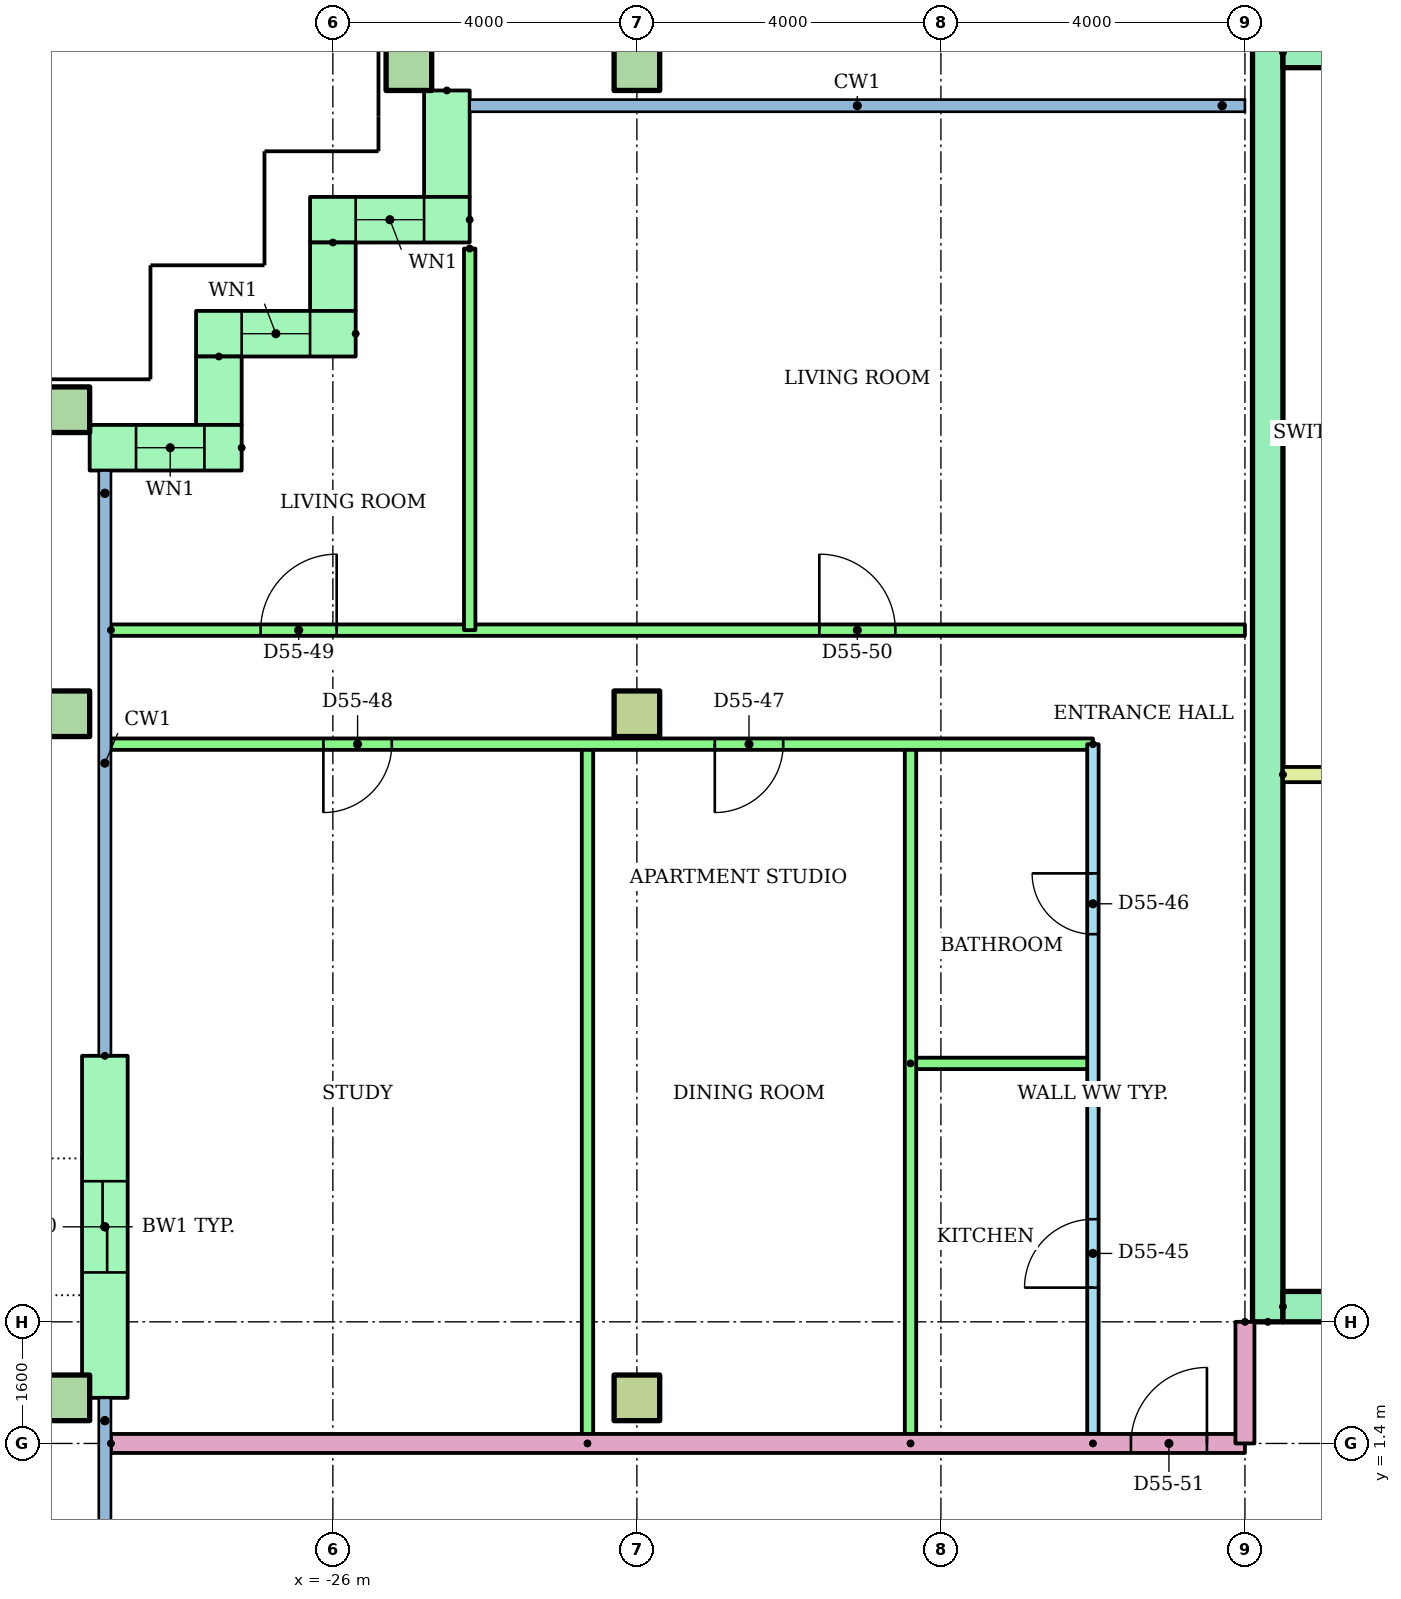
"""IFC4 building model, lengths in metres.
Left out: names, types, materials, properties, quantities, classifications, styles, units other than length and angle.
Written with IfcOpenShell. Run it as: python <this file> out.ifc"""

import sys

from ifc_helpers import new_model, si_unit, direction, frame, frame_2d, origin, origin_2d, place, context, subcontext, project, spatial, rectangle, hollow_rectangle, extrude, element, fill, save


model = new_model("IFC4")
c1 = context("Model", 3, precision=1e-05, world=origin(), true_north=direction((0.0, 1.0)))
c2 = subcontext(c1, "Body", "Model", "MODEL_VIEW")
j1 = project(units=[si_unit("LENGTHUNIT", "METRE"), si_unit("PLANEANGLEUNIT", "RADIAN")], contexts=[c1])
p1 = place(None, origin())
s1 = spatial("IfcSite", under=j1, at=p1, CompositionType="ELEMENT")
p2 = place(p1, origin())
s2 = spatial("IfcBuilding", under=s1, at=p2, CompositionType="ELEMENT")
p3 = place(p2, frame((0.0, 0.0, 214.0)))
s3 = spatial("IfcBuildingStorey", under=s2, at=p3, CompositionType="ELEMENT", Elevation=214.0)
p4 = place(p3, frame((-29.5, 2.0, 0.0)))
e1 = element("IfcColumn", 1, at=p4, inside=s3, PredefinedType="COLUMN", context=c2, shape_type="SweptSolid", body=[
    extrude(hollow_rectangle(XDim=0.6, YDim=0.6, WallThickness=0.03, at=origin_2d()), origin(), (0.0, 0.0, 1.0), 3.2),
])
p5 = place(p3, frame((-22.0, 2.0, 0.0)))
e2 = element("IfcColumn", 2, at=p5, inside=s3, PredefinedType="COLUMN", context=c2, shape_type="SweptSolid", body=[
    extrude(rectangle(XDim=0.6, YDim=0.6, at=origin_2d()), origin(), (0.0, 0.0, 1.0), 3.2),
])
p6 = place(p3, frame((-29.5, 11.0, 0.0)))
e3 = element("IfcColumn", 3, at=p6, inside=s3, PredefinedType="COLUMN", context=c2, shape_type="SweptSolid", body=[
    extrude(hollow_rectangle(XDim=0.6, YDim=0.6, WallThickness=0.03, at=origin_2d()), origin(), (0.0, 0.0, 1.0), 3.2),
])
p7 = place(p3, frame((-22.0, 11.0, 0.0)))
e4 = element("IfcColumn", 4, at=p7, inside=s3, PredefinedType="COLUMN", context=c2, shape_type="SweptSolid", body=[
    extrude(rectangle(XDim=0.6, YDim=0.6, at=origin_2d()), origin(), (0.0, 0.0, 1.0), 3.2),
])
for number, where in (
    (5, (-29.5, 15.0, 0.0)),
    (6, (-25.0, 19.5, 0.0)),
    (7, (-22.0, 19.5, 0.0)),
):
    element("IfcColumn", number, at=place(p3, frame(where)), inside=s3, PredefinedType="COLUMN", context=c2, shape_type="SweptSolid", body=[
        extrude(hollow_rectangle(XDim=0.6, YDim=0.6, WallThickness=0.03, at=origin_2d()), origin(), (0.0, 0.0, 1.0), 3.2),
    ])
p8 = place(p3, frame((-24.5, 19.2, 0.0), z_axis=(0.0, 0.0, 1.0), x_axis=(0.0, -1.0, 0.0)))
e8 = element("IfcWall", 8, at=p8, inside=s3, PredefinedType="STANDARD", context=c2, shape_type="SweptSolid", body=[
    extrude(rectangle(XDim=1.4, YDim=0.6, at=frame_2d((0.7, 0.0))), origin(), (0.0, 0.0, 1.0), 2.92),
])
p9 = place(p3, frame((-24.2, 17.5, 0.0), z_axis=(0.0, 0.0, 1.0), x_axis=(-1.0, 0.0, 0.0)))
e9 = element("IfcWall", 9, at=p9, inside=s3, PredefinedType="STANDARD", context=c2, shape_type="SweptSolid", body=[
    extrude(rectangle(XDim=2.1, YDim=0.6, at=frame_2d((1.05, 0.0))), origin(), (0.0, 0.0, 1.0), 2.92),
])
p10 = place(p9, frame((0.6, 0.0, 0.9)))
e10 = element("IfcOpeningElement", 10, at=p10, cuts=e9, PredefinedType="OPENING", context=c2, shape_type="SweptSolid", body=[
    extrude(rectangle(XDim=0.9, YDim=1.5, at=frame_2d((0.45, 0.75))), frame((0.0, 0.31, 0.0), z_axis=(0.0, -1.0, 0.0), x_axis=(1.0, 0.0, 0.0)), (0.0, 0.0, 1.0), 0.62),
])
p11 = place(p3, frame((-26.0, 17.2, 0.0), z_axis=(0.0, 0.0, 1.0), x_axis=(0.0, -1.0, 0.0)))
e11 = element("IfcWall", 11, at=p11, inside=s3, PredefinedType="STANDARD", context=c2, shape_type="SweptSolid", body=[
    extrude(rectangle(XDim=0.9, YDim=0.6, at=frame_2d((0.45, 0.0))), origin(), (0.0, 0.0, 1.0), 2.92),
])
p12 = place(p3, frame((-25.7, 16.0, 0.0), z_axis=(0.0, 0.0, 1.0), x_axis=(-1.0, 0.0, 0.0)))
e12 = element("IfcWall", 12, at=p12, inside=s3, PredefinedType="STANDARD", context=c2, shape_type="SweptSolid", body=[
    extrude(rectangle(XDim=2.1, YDim=0.6, at=frame_2d((1.05, 0.0))), origin(), (0.0, 0.0, 1.0), 2.92),
])
p13 = place(p12, frame((0.6, 0.0, 0.9)))
e13 = element("IfcOpeningElement", 13, at=p13, cuts=e12, PredefinedType="OPENING", context=c2, shape_type="SweptSolid", body=[
    extrude(rectangle(XDim=0.9, YDim=1.5, at=frame_2d((0.45, 0.75))), frame((0.0, 0.31, 0.0), z_axis=(0.0, -1.0, 0.0), x_axis=(1.0, 0.0, 0.0)), (0.0, 0.0, 1.0), 0.62),
])
p14 = place(p3, frame((-27.5, 15.7, 0.0), z_axis=(0.0, 0.0, 1.0), x_axis=(0.0, -1.0, 0.0)))
e14 = element("IfcWall", 14, at=p14, inside=s3, PredefinedType="STANDARD", context=c2, shape_type="SweptSolid", body=[
    extrude(rectangle(XDim=0.9, YDim=0.6, at=frame_2d((0.45, 0.0))), origin(), (0.0, 0.0, 1.0), 2.92),
])
p15 = place(p3, frame((-27.2, 14.5, 0.0), z_axis=(0.0, 0.0, 1.0), x_axis=(-1.0, 0.0, 0.0)))
e15 = element("IfcWall", 15, at=p15, inside=s3, PredefinedType="STANDARD", context=c2, shape_type="SweptSolid", body=[
    extrude(rectangle(XDim=2.0, YDim=0.6, at=frame_2d((1.0, 0.0))), origin(), (0.0, 0.0, 1.0), 2.92),
])
p16 = place(p15, frame((0.49, 0.0, 0.9)))
e16 = element("IfcOpeningElement", 16, at=p16, cuts=e15, PredefinedType="OPENING", context=c2, shape_type="SweptSolid", body=[
    extrude(rectangle(XDim=0.9, YDim=1.5, at=frame_2d((0.45, 0.75))), frame((0.0, 0.31, 0.0), z_axis=(0.0, -1.0, 0.0), x_axis=(1.0, 0.0, 0.0)), (0.0, 0.0, 1.0), 0.62),
])
p17 = place(p3, frame((-29.0, 6.5, 0.0), z_axis=(0.0, 0.0, 1.0), x_axis=(0.0, -1.0, 0.0)))
e17 = element("IfcWall", 17, at=p17, inside=s3, PredefinedType="STANDARD", context=c2, shape_type="SweptSolid", body=[
    extrude(rectangle(XDim=4.5, YDim=0.6, at=frame_2d((2.25, 0.0))), origin(), (0.0, 0.0, 1.0), 2.92),
])
p18 = place(p17, frame((1.65, 0.0, 0.0)))
e18 = element("IfcOpeningElement", 18, at=p18, cuts=e17, PredefinedType="OPENING", context=c2, shape_type="SweptSolid", body=[
    extrude(rectangle(XDim=1.2, YDim=2.1, at=frame_2d((0.6, 1.05))), frame((0.0, 0.31, 0.0), z_axis=(0.0, -1.0, 0.0), x_axis=(1.0, 0.0, 0.0)), (0.0, 0.0, 1.0), 0.62),
])
p19 = place(p3, frame((-13.7, 3.0, 0.0), z_axis=(0.0, 0.0, 1.0), x_axis=(0.0, 1.0, 0.0)))
e19 = element("IfcWall", 19, at=p19, inside=s3, PredefinedType="SHEAR", context=c2, shape_type="SweptSolid", body=[
    extrude(rectangle(XDim=17.0, YDim=0.4, at=frame_2d((8.5, 0.0))), origin(), (0.0, 0.0, 1.0), 2.92),
])
p20 = place(p3, frame((-13.5, 19.7, 0.0)))
e20 = element("IfcWall", 20, at=p20, inside=s3, PredefinedType="SHEAR", context=c2, shape_type="SweptSolid", body=[
    extrude(rectangle(XDim=27.0, YDim=0.4, at=frame_2d((13.5, 0.0))), origin(), (0.0, 0.0, 1.0), 2.92),
])
p21 = place(p3, frame((-13.5, 3.2, 0.0)))
e21 = element("IfcWall", 21, at=p21, inside=s3, PredefinedType="SHEAR", context=c2, shape_type="SweptSolid", body=[
    extrude(rectangle(XDim=27.0, YDim=0.4, at=frame_2d((13.5, 0.0))), origin(), (0.0, 0.0, 1.0), 2.92),
])
p22 = place(p21, frame((22.083, 0.0, 0.0)))
e22 = element("IfcOpeningElement", 22, at=p22, cuts=e21, PredefinedType="OPENING", context=c2, shape_type="SweptSolid", body=[
    extrude(rectangle(XDim=1.1, YDim=2.1, at=frame_2d((0.55, 1.05))), frame((0.0, 0.21, 0.0), z_axis=(0.0, -1.0, 0.0), x_axis=(1.0, 0.0, 0.0)), (0.0, 0.0, 1.0), 0.42),
])
p23 = place(p21, frame((25.128, 0.0, 0.0)))
e23 = element("IfcOpeningElement", 23, at=p23, cuts=e21, PredefinedType="OPENING", context=c2, shape_type="SweptSolid", body=[
    extrude(rectangle(XDim=1.1, YDim=2.1, at=frame_2d((0.55, 1.05))), frame((0.0, 0.21, 0.0), z_axis=(0.0, -1.0, 0.0), x_axis=(1.0, 0.0, 0.0)), (0.0, 0.0, 1.0), 0.42),
])
p24 = place(p21, frame((12.6, 0.0, 0.0)))
e24 = element("IfcOpeningElement", 24, at=p24, cuts=e21, PredefinedType="OPENING", context=c2, shape_type="SweptSolid", body=[
    extrude(rectangle(XDim=1.8, YDim=2.1, at=frame_2d((0.9, 1.05))), frame((0.0, 0.21, 0.0), z_axis=(0.0, -1.0, 0.0), x_axis=(1.0, 0.0, 0.0)), (0.0, 0.0, 1.0), 0.42),
])
p25 = place(p3, frame((-13.5, 10.2, 0.0)))
e25 = element("IfcWall", 25, at=p25, inside=s3, PredefinedType="PARTITIONING", context=c2, shape_type="SweptSolid", body=[
    extrude(rectangle(XDim=3.9, YDim=0.2, at=frame_2d((1.95, 0.0))), origin(), (0.0, 0.0, 1.0), 2.92),
])
p26 = place(p3, frame((-16.0, 1.4, 0.0), z_axis=(0.0, 0.0, 1.0), x_axis=(0.0, 1.0, 0.0)))
e26 = element("IfcWall", 26, at=p26, inside=s3, PredefinedType="PARTITIONING", context=c2, shape_type="SweptSolid", body=[
    extrude(rectangle(XDim=9.2, YDim=0.15, at=frame_2d((4.6, 0.0))), origin(), (0.0, 0.0, 1.0), 2.4),
])
p27 = place(p26, frame((2.05, 0.0, 0.0)))
e27 = element("IfcOpeningElement", 27, at=p27, cuts=e26, PredefinedType="OPENING", context=c2, shape_type="SweptSolid", body=[
    extrude(rectangle(XDim=0.9, YDim=2.1, at=frame_2d((0.45, 1.05))), frame((0.0, 0.085, 0.0), z_axis=(0.0, -1.0, 0.0), x_axis=(1.0, 0.0, 0.0)), (0.0, 0.0, 1.0), 0.17),
])
p28 = place(p26, frame((6.7, 0.0, 0.0)))
e28 = element("IfcOpeningElement", 28, at=p28, cuts=e26, PredefinedType="OPENING", context=c2, shape_type="SweptSolid", body=[
    extrude(rectangle(XDim=0.8, YDim=2.1, at=frame_2d((0.4, 1.05))), frame((0.0, 0.085, 0.0), z_axis=(0.0, -1.0, 0.0), x_axis=(1.0, 0.0, 0.0)), (0.0, 0.0, 1.0), 0.17),
])
p29 = place(p3, frame((-18.4, 6.4, 0.0)))
e29 = element("IfcWall", 29, at=p29, inside=s3, PredefinedType="PARTITIONING", context=c2, shape_type="SweptSolid", body=[
    extrude(rectangle(XDim=2.4, YDim=0.15, at=frame_2d((1.2, 0.0))), origin(), (0.0, 0.0, 1.0), 2.4),
])
for number, where, z_axis, x_axis in (
    (30, (-18.4, 1.4, 0.0), (0.0, 0.0, 1.0), (0.0, 1.0, 0.0)),
    (31, (-22.65, 1.4, 0.0), (0.0, 0.0, 1.0), (0.0, 1.0, 0.0)),
):
    element("IfcWall", number, at=place(p3, frame(where, z_axis=z_axis, x_axis=x_axis)), inside=s3, PredefinedType="PARTITIONING", context=c2, shape_type="SweptSolid", body=[
        extrude(rectangle(XDim=9.2, YDim=0.15, at=frame_2d((4.6, 0.0))), origin(), (0.0, 0.0, 1.0), 2.4),
    ])
p30 = place(p3, frame((-16.0, 10.6, 0.0), z_axis=(0.0, 0.0, 1.0), x_axis=(-1.0, 0.0, 0.0)))
e32 = element("IfcWall", 32, at=p30, inside=s3, PredefinedType="PARTITIONING", context=c2, shape_type="SweptSolid", body=[
    extrude(rectangle(XDim=12.92, YDim=0.15, at=frame_2d((6.46, 0.0))), origin(), (0.0, 0.0, 1.0), 2.4),
])
p31 = place(p30, frame((4.075, 0.0, 0.0)))
e33 = element("IfcOpeningElement", 33, at=p31, cuts=e32, PredefinedType="OPENING", context=c2, shape_type="SweptSolid", body=[
    extrude(rectangle(XDim=0.9, YDim=2.1, at=frame_2d((0.45, 1.05))), frame((0.0, 0.085, 0.0), z_axis=(0.0, -1.0, 0.0), x_axis=(1.0, 0.0, 0.0)), (0.0, 0.0, 1.0), 0.17),
])
p32 = place(p30, frame((9.225, 0.0, 0.0)))
e34 = element("IfcOpeningElement", 34, at=p32, cuts=e32, PredefinedType="OPENING", context=c2, shape_type="SweptSolid", body=[
    extrude(rectangle(XDim=0.9, YDim=2.1, at=frame_2d((0.45, 1.05))), frame((0.0, 0.085, 0.0), z_axis=(0.0, -1.0, 0.0), x_axis=(1.0, 0.0, 0.0)), (0.0, 0.0, 1.0), 0.17),
])
p33 = place(p3, frame((-28.92, 12.1, 0.0)))
e35 = element("IfcWall", 35, at=p33, inside=s3, PredefinedType="PARTITIONING", context=c2, shape_type="SweptSolid", body=[
    extrude(rectangle(XDim=14.92, YDim=0.15, at=frame_2d((7.46, 0.0))), origin(), (0.0, 0.0, 1.0), 2.4),
])
p34 = place(p33, frame((1.97, 0.0, 0.0)))
e36 = element("IfcOpeningElement", 36, at=p34, cuts=e35, PredefinedType="OPENING", context=c2, shape_type="SweptSolid", body=[
    extrude(rectangle(XDim=1.0, YDim=2.1, at=frame_2d((0.5, 1.05))), frame((0.0, 0.085, 0.0), z_axis=(0.0, -1.0, 0.0), x_axis=(1.0, 0.0, 0.0)), (0.0, 0.0, 1.0), 0.17),
])
p35 = place(p33, frame((9.32, 0.0, 0.0)))
e37 = element("IfcOpeningElement", 37, at=p35, cuts=e35, PredefinedType="OPENING", context=c2, shape_type="SweptSolid", body=[
    extrude(rectangle(XDim=1.0, YDim=2.1, at=frame_2d((0.5, 1.05))), frame((0.0, 0.085, 0.0), z_axis=(0.0, -1.0, 0.0), x_axis=(1.0, 0.0, 0.0)), (0.0, 0.0, 1.0), 0.17),
])
p36 = place(p3, frame((-24.2, 17.12, 0.0), z_axis=(0.0, 0.0, 1.0), x_axis=(0.0, -1.0, 0.0)))
e38 = element("IfcWall", 38, at=p36, inside=s3, PredefinedType="PARTITIONING", context=c2, shape_type="SweptSolid", body=[
    extrude(rectangle(XDim=5.02, YDim=0.15, at=frame_2d((2.51, 0.0))), origin(), (0.0, 0.0, 1.0), 2.4),
])
p37 = place(p3, frame((-28.92, 1.4, 0.0)))
e39 = element("IfcWall", 39, at=p37, inside=s3, PredefinedType="PARTITIONING", context=c2, shape_type="SweptSolid", body=[
    extrude(rectangle(XDim=14.92, YDim=0.25, at=frame_2d((7.46, 0.0))), origin(), (0.0, 0.0, 1.0), 2.4),
])
p38 = place(p37, frame((13.42, 0.0, 0.0)))
e40 = element("IfcOpeningElement", 40, at=p38, cuts=e39, PredefinedType="OPENING", context=c2, shape_type="SweptSolid", body=[
    extrude(rectangle(XDim=1.0, YDim=2.1, at=frame_2d((0.5, 1.05))), frame((0.0, 0.135, 0.0), z_axis=(0.0, -1.0, 0.0), x_axis=(1.0, 0.0, 0.0)), (0.0, 0.0, 1.0), 0.27),
])
p39 = place(p3, frame((-14.0, 3.0, 0.0), z_axis=(0.0, 0.0, 1.0), x_axis=(0.0, -1.0, 0.0)))
e41 = element("IfcWall", 41, at=p39, inside=s3, PredefinedType="PARTITIONING", context=c2, shape_type="SweptSolid", body=[
    extrude(rectangle(XDim=1.6, YDim=0.25, at=frame_2d((0.8, 0.0))), origin(), (0.0, 0.0, 1.0), 2.4),
])
p40 = place(p10, origin())
e42 = element("IfcWindow", 42, at=p40, inside=s3, PartitioningType="SINGLE_PANEL", PredefinedType="WINDOW", context=c2, shape_type="SweptSolid", body=[
    extrude(rectangle(XDim=0.9, YDim=1.5, at=frame_2d((0.45, 0.75))), frame((0.0, 0.03, 0.0), z_axis=(0.0, -1.0, 0.0), x_axis=(1.0, 0.0, 0.0)), (0.0, 0.0, 1.0), 0.06),
])
fill(e10, e42)
p41 = place(p13, origin())
e43 = element("IfcWindow", 43, at=p41, inside=s3, PartitioningType="SINGLE_PANEL", PredefinedType="WINDOW", context=c2, shape_type="SweptSolid", body=[
    extrude(rectangle(XDim=0.9, YDim=1.5, at=frame_2d((0.45, 0.75))), frame((0.0, 0.03, 0.0), z_axis=(0.0, -1.0, 0.0), x_axis=(1.0, 0.0, 0.0)), (0.0, 0.0, 1.0), 0.06),
])
fill(e13, e43)
p42 = place(p16, origin())
e44 = element("IfcWindow", 44, at=p42, inside=s3, PartitioningType="SINGLE_PANEL", PredefinedType="WINDOW", context=c2, shape_type="SweptSolid", body=[
    extrude(rectangle(XDim=0.9, YDim=1.5, at=frame_2d((0.45, 0.75))), frame((0.0, 0.03, 0.0), z_axis=(0.0, -1.0, 0.0), x_axis=(1.0, 0.0, 0.0)), (0.0, 0.0, 1.0), 0.06),
])
fill(e16, e44)
p43 = place(p27, origin())
e45 = element("IfcDoor", 45, at=p43, inside=s3, OperationType="SINGLE_SWING_LEFT", PredefinedType="DOOR", context=c2, shape_type="SweptSolid", body=[
    extrude(rectangle(XDim=0.9, YDim=2.1, at=frame_2d((0.45, 1.05))), frame((0.0, 0.025, 0.0), z_axis=(0.0, -1.0, 0.0), x_axis=(1.0, 0.0, 0.0)), (0.0, 0.0, 1.0), 0.05),
])
fill(e27, e45)
p44 = place(p28, origin())
e46 = element("IfcDoor", 46, at=p44, inside=s3, OperationType="SINGLE_SWING_RIGHT", PredefinedType="DOOR", context=c2, shape_type="SweptSolid", body=[
    extrude(rectangle(XDim=0.8, YDim=2.1, at=frame_2d((0.4, 1.05))), frame((0.0, 0.025, 0.0), z_axis=(0.0, -1.0, 0.0), x_axis=(1.0, 0.0, 0.0)), (0.0, 0.0, 1.0), 0.05),
])
fill(e28, e46)
p45 = place(p31, origin())
e47 = element("IfcDoor", 47, at=p45, inside=s3, OperationType="SINGLE_SWING_RIGHT", PredefinedType="DOOR", context=c2, shape_type="SweptSolid", body=[
    extrude(rectangle(XDim=0.9, YDim=2.1, at=frame_2d((0.45, 1.05))), frame((0.0, 0.025, 0.0), z_axis=(0.0, -1.0, 0.0), x_axis=(1.0, 0.0, 0.0)), (0.0, 0.0, 1.0), 0.05),
])
fill(e33, e47)
p46 = place(p32, origin())
e48 = element("IfcDoor", 48, at=p46, inside=s3, OperationType="SINGLE_SWING_RIGHT", PredefinedType="DOOR", context=c2, shape_type="SweptSolid", body=[
    extrude(rectangle(XDim=0.9, YDim=2.1, at=frame_2d((0.45, 1.05))), frame((0.0, 0.025, 0.0), z_axis=(0.0, -1.0, 0.0), x_axis=(1.0, 0.0, 0.0)), (0.0, 0.0, 1.0), 0.05),
])
fill(e34, e48)
p47 = place(p34, origin())
e49 = element("IfcDoor", 49, at=p47, inside=s3, OperationType="SINGLE_SWING_RIGHT", PredefinedType="DOOR", context=c2, shape_type="SweptSolid", body=[
    extrude(rectangle(XDim=1.0, YDim=2.1, at=frame_2d((0.5, 1.05))), frame((0.0, 0.025, 0.0), z_axis=(0.0, -1.0, 0.0), x_axis=(1.0, 0.0, 0.0)), (0.0, 0.0, 1.0), 0.05),
])
fill(e36, e49)
p48 = place(p35, origin())
e50 = element("IfcDoor", 50, at=p48, inside=s3, OperationType="SINGLE_SWING_LEFT", PredefinedType="DOOR", context=c2, shape_type="SweptSolid", body=[
    extrude(rectangle(XDim=1.0, YDim=2.1, at=frame_2d((0.5, 1.05))), frame((0.0, 0.025, 0.0), z_axis=(0.0, -1.0, 0.0), x_axis=(1.0, 0.0, 0.0)), (0.0, 0.0, 1.0), 0.05),
])
fill(e37, e50)
p49 = place(p38, origin())
e51 = element("IfcDoor", 51, at=p49, inside=s3, OperationType="SINGLE_SWING_RIGHT", PredefinedType="DOOR", context=c2, shape_type="SweptSolid", body=[
    extrude(rectangle(XDim=1.0, YDim=2.1, at=frame_2d((0.5, 1.05))), frame((0.0, 0.025, 0.0), z_axis=(0.0, -1.0, 0.0), x_axis=(1.0, 0.0, 0.0)), (0.0, 0.0, 1.0), 0.05),
])
fill(e40, e51)
p50 = place(p18, origin())
e52 = element("IfcDoor", 52, at=p50, inside=s3, OperationType="SLIDING_TO_LEFT", PredefinedType="DOOR", context=c2, shape_type="SweptSolid", body=[
    extrude(rectangle(XDim=1.2, YDim=2.1, at=frame_2d((0.6, 1.05))), frame((0.0, 0.025, 0.0), z_axis=(0.0, -1.0, 0.0), x_axis=(1.0, 0.0, 0.0)), (0.0, 0.0, 1.0), 0.05),
])
fill(e18, e52)
save(model, sys.argv[1])
